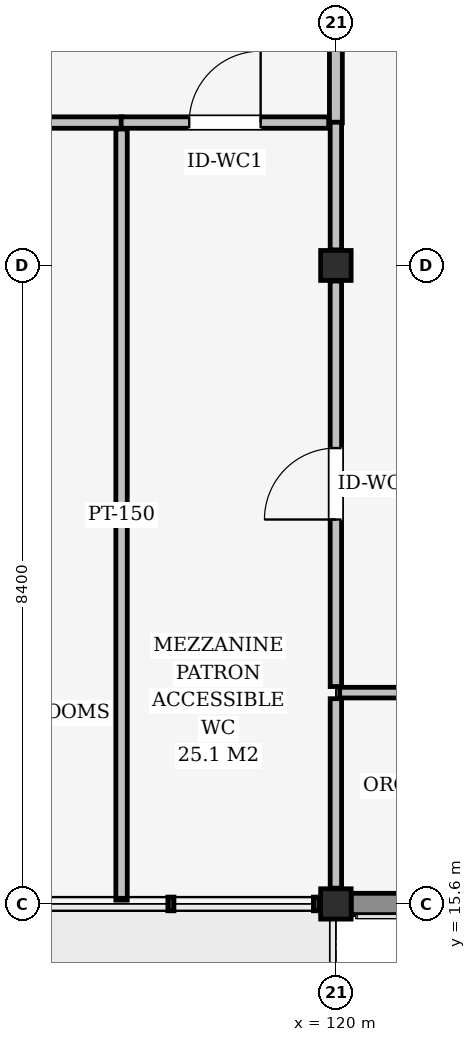
"""IFC4 building model, lengths in metres.
Left out: names, types, materials, properties, quantities, classifications, styles, units other than length and angle.
Written with IfcOpenShell. Run it as: python <this file> out.ifc"""

import sys

from ifc_helpers import new_model, si_unit, direction, frame, frame_2d, origin, origin_2d, place, context, subcontext, project, spatial, rectangle, i_section, extrude, element, fill, save


model = new_model("IFC4")
c1 = context("Model", 3, precision=1e-05, world=origin(), true_north=direction((0.0, 1.0)))
c2 = subcontext(c1, "Body", "Model", "MODEL_VIEW")
j1 = project(units=[si_unit("LENGTHUNIT", "METRE"), si_unit("PLANEANGLEUNIT", "RADIAN")], contexts=[c1])
p1 = place(None, origin())
s1 = spatial("IfcSite", under=j1, at=p1, CompositionType="ELEMENT")
p2 = place(p1, origin())
s2 = spatial("IfcBuilding", under=s1, at=p2, CompositionType="ELEMENT")
p3 = place(p2, frame((0.0, 0.0, 4.8)))
s3 = spatial("IfcBuildingStorey", under=s2, at=p3, CompositionType="ELEMENT", Elevation=4.8)
p4 = place(p3, frame((120.0, 15.6, 0.0), z_axis=(0.0, 0.0, 1.0), x_axis=(1.0, 0.0, 0.0)))
e1 = element("IfcColumn", 1, at=p4, inside=s3, PredefinedType="COLUMN", context=c2, shape_type="SweptSolid", body=[
    extrude(i_section(OverallWidth=0.401, OverallDepth=0.399, WebThickness=0.025, FlangeThickness=0.04, at=origin_2d()), origin(), (0.0, 0.0, 1.0), 4.5),
])
p5 = place(p3, frame((120.0, 24.0, 0.0), z_axis=(0.0, 0.0, 1.0), x_axis=(1.0, 0.0, 0.0)))
e2 = element("IfcColumn", 2, at=p5, inside=s3, PredefinedType="COLUMN", context=c2, shape_type="SweptSolid", body=[
    extrude(i_section(OverallWidth=0.401, OverallDepth=0.394, WebThickness=0.023, FlangeThickness=0.037, at=origin_2d()), origin(), (0.0, 0.0, 1.0), 4.5),
])
p6 = place(p3, frame((131.8, 15.6, 0.0), z_axis=(0.0, 0.0, 1.0), x_axis=(-1.0, 0.0, 0.0)))
e3 = element("IfcWall", 3, at=p6, inside=s3, PredefinedType="SOLIDWALL", context=c2, shape_type="SweptSolid", body=[
    extrude(rectangle(XDim=11.599, YDim=0.28, at=frame_2d((5.8, 0.0))), origin(), (0.0, 0.0, 1.0), 3.507),
])
p7 = place(p6, frame((1.998, 0.0, 0.85)))
e4 = element("IfcOpeningElement", 4, at=p7, cuts=e3, PredefinedType="OPENING", context=c2, shape_type="SweptSolid", body=[
    extrude(rectangle(XDim=2.5, YDim=1.9, at=frame_2d((1.25, 0.95))), frame((0.0, 0.15, 0.0), z_axis=(0.0, -1.0, 0.0), x_axis=(1.0, 0.0, 0.0)), (0.0, 0.0, 1.0), 0.3),
])
p8 = place(p3, frame((120.05, 18.38, 0.0), z_axis=(0.0, 0.0, 1.0), x_axis=(1.0, 0.0, 0.0)))
e5 = element("IfcWall", 5, at=p8, inside=s3, PredefinedType="PARTITIONING", context=c2, shape_type="SweptSolid", body=[
    extrude(rectangle(XDim=23.835, YDim=0.14, at=frame_2d((11.917, 0.0))), origin(), (0.0, 0.0, 1.0), 4.2),
])
p9 = place(p8, frame((11.442, 0.0, 0.0)))
e6 = element("IfcOpeningElement", 6, at=p9, cuts=e5, PredefinedType="OPENING", context=c2, shape_type="SweptSolid", body=[
    extrude(rectangle(XDim=0.95, YDim=2.12, at=frame_2d((0.475, 1.06))), frame((0.0, 0.08, 0.0), z_axis=(0.0, -1.0, 0.0), x_axis=(1.0, 0.0, 0.0)), (0.0, 0.0, 1.0), 0.16),
])
p10 = place(p3, frame((120.0, 25.875, 0.0), z_axis=(0.0, 0.0, 1.0), x_axis=(0.0, 1.0, 0.0)))
e7 = element("IfcWall", 7, at=p10, inside=s3, PredefinedType="PARTITIONING", context=c2, shape_type="SweptSolid", body=[
    extrude(rectangle(XDim=3.92, YDim=0.17, at=frame_2d((1.96, 0.0))), origin(), (0.0, 0.0, 1.0), 3.588),
])
p11 = place(p10, frame((1.35, 0.0, 0.0)))
e8 = element("IfcOpeningElement", 8, at=p11, cuts=e7, PredefinedType="OPENING", context=c2, shape_type="SweptSolid", body=[
    extrude(rectangle(XDim=1.22, YDim=2.18, at=frame_2d((0.61, 1.09))), frame((0.0, 0.095, 0.0), z_axis=(0.0, -1.0, 0.0), x_axis=(1.0, 0.0, 0.0)), (0.0, 0.0, 1.0), 0.19),
])
p12 = place(p3, frame((120.0, 18.46, 0.0), z_axis=(0.0, 0.0, 1.0), x_axis=(0.0, 1.0, 0.0)))
e9 = element("IfcWall", 9, at=p12, inside=s3, PredefinedType="PARTITIONING", context=c2, shape_type="SweptSolid", body=[
    extrude(rectangle(XDim=5.335, YDim=0.15, at=frame_2d((2.667, 0.0))), origin(), (0.0, 0.0, 1.0), 3.588),
])
p13 = place(p12, frame((2.198, 0.0, 0.0)))
e10 = element("IfcOpeningElement", 10, at=p13, cuts=e9, PredefinedType="OPENING", context=c2, shape_type="SweptSolid", body=[
    extrude(rectangle(XDim=0.94, YDim=2.1, at=frame_2d((0.47, 1.05))), frame((0.0, 0.085, 0.0), z_axis=(0.0, -1.0, 0.0), x_axis=(1.0, 0.0, 0.0)), (0.0, 0.0, 1.0), 0.17),
])
p14 = place(p3, frame((120.0, 24.205, 0.0), z_axis=(0.0, 0.0, 1.0), x_axis=(0.0, 1.0, 0.0)))
e11 = element("IfcWall", 11, at=p14, inside=s3, PredefinedType="PARTITIONING", context=c2, shape_type="SweptSolid", body=[
    extrude(rectangle(XDim=1.68, YDim=0.15, at=frame_2d((0.84, 0.0))), origin(), (0.0, 0.0, 1.0), 3.588),
])
p15 = place(p3, frame((120.0, 15.808, 0.0), z_axis=(0.0, 0.0, 1.0), x_axis=(0.0, 1.0, 0.0)))
e12 = element("IfcWall", 12, at=p15, inside=s3, PredefinedType="PARTITIONING", context=c2, shape_type="SweptSolid", body=[
    extrude(rectangle(XDim=2.492, YDim=0.15, at=frame_2d((1.246, 0.0))), origin(), (0.0, 0.0, 1.0), 3.588),
])
p16 = place(p3, frame((107.95, 25.88, 0.0), z_axis=(0.0, 0.0, 1.0), x_axis=(1.0, 0.0, 0.0)))
e13 = element("IfcWall", 13, at=p16, inside=s3, PredefinedType="PARTITIONING", context=c2, shape_type="SweptSolid", body=[
    extrude(rectangle(XDim=9.235, YDim=0.15, at=frame_2d((4.618, 0.0))), origin(), (0.0, 0.0, 1.0), 4.23),
])
p17 = place(p16, frame((4.113, 0.0, 0.0)))
e14 = element("IfcOpeningElement", 14, at=p17, cuts=e13, PredefinedType="OPENING", context=c2, shape_type="SweptSolid", body=[
    extrude(rectangle(XDim=1.01, YDim=2.1, at=frame_2d((0.505, 1.05))), frame((0.0, 0.085, 0.0), z_axis=(0.0, -1.0, 0.0), x_axis=(1.0, 0.0, 0.0)), (0.0, 0.0, 1.0), 0.17),
])
p18 = place(p3, frame((117.175, 25.88, 0.0), z_axis=(0.0, 0.0, 1.0), x_axis=(1.0, 0.0, 0.0)))
e15 = element("IfcWall", 15, at=p18, inside=s3, PredefinedType="PARTITIONING", context=c2, shape_type="SweptSolid", body=[
    extrude(rectangle(XDim=2.73, YDim=0.15, at=frame_2d((1.365, 0.0))), origin(), (0.0, 0.0, 1.0), 4.23),
])
p19 = place(p18, frame((0.895, 0.0, 0.0)))
e16 = element("IfcOpeningElement", 16, at=p19, cuts=e15, PredefinedType="OPENING", context=c2, shape_type="SweptSolid", body=[
    extrude(rectangle(XDim=0.94, YDim=2.1, at=frame_2d((0.47, 1.05))), frame((0.0, 0.085, 0.0), z_axis=(0.0, -1.0, 0.0), x_axis=(1.0, 0.0, 0.0)), (0.0, 0.0, 1.0), 0.17),
])
p20 = place(p3, frame((117.18, 15.65, 0.0), z_axis=(0.0, 0.0, 1.0), x_axis=(0.0, 1.0, 0.0)))
e17 = element("IfcWall", 17, at=p20, inside=s3, PredefinedType="PARTITIONING", context=c2, shape_type="SweptSolid", body=[
    extrude(rectangle(XDim=10.145, YDim=0.15, at=frame_2d((5.073, 0.0))), origin(), (0.0, 0.0, 1.0), 3.816),
])
p21 = place(p13, origin())
e18 = element("IfcDoor", 18, at=p21, inside=s3, OperationType="SINGLE_SWING_LEFT", PredefinedType="DOOR", context=c2, shape_type="SweptSolid", body=[
    extrude(rectangle(XDim=0.94, YDim=2.1, at=frame_2d((0.47, 1.05))), frame((0.0, 0.025, 0.0), z_axis=(0.0, -1.0, 0.0), x_axis=(1.0, 0.0, 0.0)), (0.0, 0.0, 1.0), 0.05),
])
fill(e10, e18)
p22 = place(p19, origin())
e19 = element("IfcDoor", 19, at=p22, inside=s3, OperationType="SINGLE_SWING_RIGHT", PredefinedType="DOOR", context=c2, shape_type="SweptSolid", body=[
    extrude(rectangle(XDim=0.94, YDim=2.1, at=frame_2d((0.47, 1.05))), frame((0.0, 0.025, 0.0), z_axis=(0.0, -1.0, 0.0), x_axis=(1.0, 0.0, 0.0)), (0.0, 0.0, 1.0), 0.05),
])
fill(e16, e19)
save(model, sys.argv[1])
